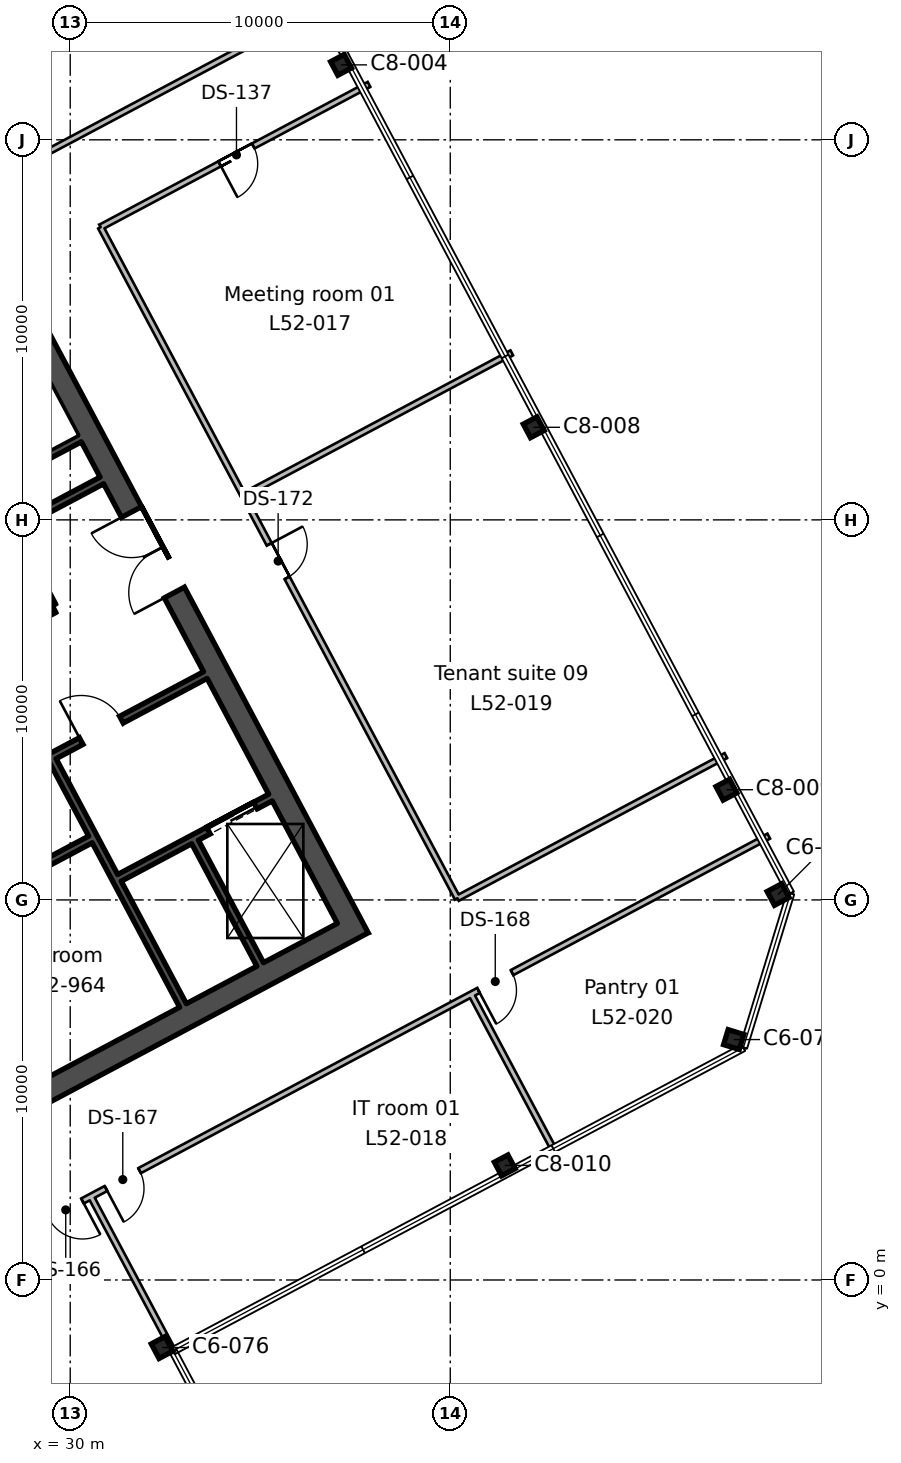
"""IFC4 building model, lengths in metres.
Left out: names, types, materials, properties, quantities, classifications, styles, units other than length and angle.
Written with IfcOpenShell. Run it as: python <this file> out.ifc"""

import sys

from ifc_helpers import new_model, si_unit, direction, frame, frame_2d, origin, origin_2d, place, context, subcontext, project, spatial, rectangle, i_section, extrude, element, fill, save


model = new_model("IFC4")
c1 = context("Model", 3, precision=1e-05, world=origin(), true_north=direction((0.0, 1.0)))
c2 = subcontext(c1, "Body", "Model", "MODEL_VIEW")
j1 = project(units=[si_unit("LENGTHUNIT", "METRE"), si_unit("PLANEANGLEUNIT", "RADIAN")], contexts=[c1])
p1 = place(None, origin())
s1 = spatial("IfcSite", under=j1, at=p1, CompositionType="ELEMENT")
p2 = place(p1, origin())
s2 = spatial("IfcBuilding", under=s1, at=p2, CompositionType="ELEMENT")
p3 = place(p2, frame((0.0, 0.0, 236.4)))
s3 = spatial("IfcBuildingStorey", under=s2, at=p3, CompositionType="ELEMENT", Elevation=236.4)
p4 = place(p3, frame((32.417, -1.777, 0.0), z_axis=(0.0, 0.0, 1.0), x_axis=(0.882947592859, 0.469471562786, 0.0)))
e1 = element("IfcColumn", 1, at=p4, inside=s3, PredefinedType="COLUMN", context=c2, shape_type="SweptSolid", body=[
    extrude(i_section(OverallWidth=0.412, OverallDepth=0.434, WebThickness=0.036, FlangeThickness=0.057, FilletRadius=0.015, at=origin_2d()), origin(), (0.0, 0.0, 1.0), 3.9),
])
p5 = place(p3, frame((41.434, 3.015, 0.0), z_axis=(0.0, 0.0, 1.0), x_axis=(0.882947592859, 0.469471562786, 0.0)))
e2 = element("IfcColumn", 2, at=p5, inside=s3, PredefinedType="COLUMN", context=c2, shape_type="SweptSolid", body=[
    extrude(i_section(OverallWidth=0.404, OverallDepth=0.406, WebThickness=0.027, FlangeThickness=0.044, FilletRadius=0.015, at=origin_2d()), origin(), (0.0, 0.0, 1.0), 3.9),
])
for number, where, z_axis, x_axis in (
    (3, (47.459, 6.326, 0.0), (0.0, 0.0, 1.0), (0.292, 0.956, 0.0)),
    (4, (48.626, 10.142, 0.0), (0.0, 0.0, 1.0), (-0.469, 0.883, 0.0)),
):
    element("IfcColumn", number, at=place(p3, frame(where, z_axis=z_axis, x_axis=x_axis)), inside=s3, PredefinedType="COLUMN", context=c2, shape_type="SweptSolid", body=[
        extrude(i_section(OverallWidth=0.412, OverallDepth=0.434, WebThickness=0.036, FlangeThickness=0.057, FilletRadius=0.015, at=origin_2d()), origin(), (0.0, 0.0, 1.0), 3.9),
    ])
for number, where, z_axis, x_axis in (
    (5, (47.266, 12.9, 0.0), (0.0, 0.0, 1.0), (-0.469, 0.883, 0.0)),
    (6, (42.196, 22.436, 0.0), (0.0, 0.0, 1.0), (-0.469, 0.883, 0.0)),
    (7, (37.126, 31.972, 0.0), (0.0, 0.0, 1.0), (-0.469, 0.883, 0.0)),
):
    element("IfcColumn", number, at=place(p3, frame(where, z_axis=z_axis, x_axis=x_axis)), inside=s3, PredefinedType="COLUMN", context=c2, shape_type="SweptSolid", body=[
        extrude(i_section(OverallWidth=0.404, OverallDepth=0.406, WebThickness=0.027, FlangeThickness=0.044, FilletRadius=0.015, at=origin_2d()), origin(), (0.0, 0.0, 1.0), 3.9),
    ])
p6 = place(p3, frame((37.576, 8.994, 0.0), z_axis=(0.0, 0.0, 1.0), x_axis=(-0.469478769487, 0.88294376095, 0.0)))
e8 = element("IfcWall", 8, at=p6, inside=s3, PredefinedType="SHEAR", context=c2, shape_type="SweptSolid", body=[
    extrude(rectangle(XDim=19.4, YDim=0.6, at=frame_2d((9.7, 0.0))), origin(), (0.0, 0.0, 1.0), 3.9),
])
p7 = place(p6, frame((10.3, 0.0, 0.0)))
e9 = element("IfcOpeningElement", 9, at=p7, cuts=e8, PredefinedType="OPENING", context=c2, shape_type="SweptSolid", body=[
    extrude(rectangle(XDim=2.4, YDim=2.4, at=frame_2d((1.2, 1.2))), frame((0.0, 0.31, 0.0), z_axis=(0.0, -1.0, 0.0), x_axis=(1.0, 0.0, 0.0)), (0.0, 0.0, 1.0), 0.62),
])
p8 = place(p3, frame((19.335, -0.366, 0.0), z_axis=(0.0, 0.0, 1.0), x_axis=(0.88294509198, 0.469476266226, 0.0)))
e10 = element("IfcWall", 10, at=p8, inside=s3, PredefinedType="SHEAR", context=c2, shape_type="SweptSolid", body=[
    extrude(rectangle(XDim=20.2, YDim=0.6, at=frame_2d((10.1, 0.0))), origin(), (0.0, 0.0, 1.0), 3.9),
])
p9 = place(p3, frame((32.968, 7.223, 0.0), z_axis=(0.0, 0.0, 1.0), x_axis=(-0.469480409012, 0.88294288918, 0.0)))
e11 = element("IfcWall", 11, at=p9, inside=s3, PredefinedType="SHEAR", context=c2, shape_type="SweptSolid", body=[
    extrude(rectangle(XDim=7.3, YDim=0.2, at=frame_2d((3.65, 0.0))), origin(), (0.0, 0.0, 1.0), 3.9),
])
p10 = place(p3, frame((29.528, 17.739, 0.0), z_axis=(0.0, 0.0, 1.0), x_axis=(-0.469401318492, 0.882984938828, 0.0)))
e12 = element("IfcWall", 12, at=p10, inside=s3, PredefinedType="SHEAR", context=c2, shape_type="SweptSolid", body=[
    extrude(rectangle(XDim=2.2, YDim=0.2, at=frame_2d((1.1, 0.0))), origin(), (0.0, 0.0, 1.0), 3.9),
])
p11 = place(p3, frame((34.999, 8.303, 0.0), z_axis=(0.0, 0.0, 1.0), x_axis=(-0.4694665462, 0.882950260207, 0.0)))
e13 = element("IfcWall", 13, at=p11, inside=s3, PredefinedType="SHEAR", context=c2, shape_type="SweptSolid", body=[
    extrude(rectangle(XDim=3.65, YDim=0.2, at=frame_2d((1.825, 0.0))), origin(), (0.0, 0.0, 1.0), 3.9),
])
p12 = place(p3, frame((31.296, 10.581, 0.0), z_axis=(0.0, 0.0, 1.0), x_axis=(0.882960433586, 0.469447412093, 0.0)))
e14 = element("IfcWall", 14, at=p12, inside=s3, PredefinedType="SHEAR", context=c2, shape_type="SweptSolid", body=[
    extrude(rectangle(XDim=4.5, YDim=0.2, at=frame_2d((2.25, 0.0))), origin(), (0.0, 0.0, 1.0), 3.9),
])
p13 = place(p12, frame((2.65, 0.0, 0.0)))
e15 = element("IfcOpeningElement", 15, at=p13, cuts=e14, PredefinedType="OPENING", context=c2, shape_type="SweptSolid", body=[
    extrude(rectangle(XDim=1.4, YDim=2.4, at=frame_2d((0.7, 1.2))), frame((0.0, 0.11, 0.0), z_axis=(0.0, -1.0, 0.0), x_axis=(1.0, 0.0, 0.0)), (0.0, 0.0, 1.0), 0.22),
])
p14 = place(p3, frame((25.941, 9.15, 0.0), z_axis=(0.0, 0.0, 1.0), x_axis=(0.882953967957, 0.469459572775, 0.0)))
e16 = element("IfcWall", 16, at=p14, inside=s3, PredefinedType="SHEAR", context=c2, shape_type="SweptSolid", body=[
    extrude(rectangle(XDim=5.2, YDim=0.2, at=frame_2d((2.6, 0.0))), origin(), (0.0, 0.0, 1.0), 3.9),
])
p15 = place(p3, frame((24.726, 11.222, 0.0), z_axis=(0.0, 0.0, 1.0), x_axis=(0.882940221191, 0.469485426614, 0.0)))
e17 = element("IfcWall", 17, at=p15, inside=s3, PredefinedType="SHEAR", context=c2, shape_type="SweptSolid", body=[
    extrude(rectangle(XDim=10.0, YDim=0.2, at=frame_2d((5.0, 0.0))), origin(), (0.0, 0.0, 1.0), 3.9),
])
p16 = place(p15, frame((6.3, 0.0, 0.0)))
e18 = element("IfcOpeningElement", 18, at=p16, cuts=e17, PredefinedType="OPENING", context=c2, shape_type="SweptSolid", body=[
    extrude(rectangle(XDim=1.2, YDim=2.1, at=frame_2d((0.6, 1.05))), frame((0.0, 0.11, 0.0), z_axis=(0.0, -1.0, 0.0), x_axis=(1.0, 0.0, 0.0)), (0.0, 0.0, 1.0), 0.22),
])
p17 = place(p15, frame((0.36, 0.0, 0.0)))
e19 = element("IfcOpeningElement", 19, at=p17, cuts=e17, PredefinedType="OPENING", context=c2, shape_type="SweptSolid", body=[
    extrude(rectangle(XDim=0.9, YDim=2.1, at=frame_2d((0.45, 1.05))), frame((0.0, 0.11, 0.0), z_axis=(0.0, -1.0, 0.0), x_axis=(1.0, 0.0, 0.0)), (0.0, 0.0, 1.0), 0.22),
])
p18 = place(p15, frame((3.06, 0.0, 0.0)))
e20 = element("IfcOpeningElement", 20, at=p18, cuts=e17, PredefinedType="OPENING", context=c2, shape_type="SweptSolid", body=[
    extrude(rectangle(XDim=0.9, YDim=2.1, at=frame_2d((0.45, 1.05))), frame((0.0, 0.11, 0.0), z_axis=(0.0, -1.0, 0.0), x_axis=(1.0, 0.0, 0.0)), (0.0, 0.0, 1.0), 0.22),
])
p19 = place(p3, frame((24.807, 15.116, 0.0), z_axis=(0.0, 0.0, 1.0), x_axis=(0.882942972946, 0.469480251476, 0.0)))
e21 = element("IfcWall", 21, at=p19, inside=s3, PredefinedType="SHEAR", context=c2, shape_type="SweptSolid", body=[
    extrude(rectangle(XDim=5.4, YDim=0.2, at=frame_2d((2.7, 0.0))), origin(), (0.0, 0.0, 1.0), 3.9),
])
p20 = place(p19, frame((0.36, 0.0, 0.0)))
e22 = element("IfcOpeningElement", 22, at=p20, cuts=e21, PredefinedType="OPENING", context=c2, shape_type="SweptSolid", body=[
    extrude(rectangle(XDim=0.9, YDim=2.1, at=frame_2d((0.45, 1.05))), frame((0.0, 0.11, 0.0), z_axis=(0.0, -1.0, 0.0), x_axis=(1.0, 0.0, 0.0)), (0.0, 0.0, 1.0), 0.22),
])
p21 = place(p19, frame((3.06, 0.0, 0.0)))
e23 = element("IfcOpeningElement", 23, at=p21, cuts=e21, PredefinedType="OPENING", context=c2, shape_type="SweptSolid", body=[
    extrude(rectangle(XDim=0.9, YDim=2.1, at=frame_2d((0.45, 1.05))), frame((0.0, 0.11, 0.0), z_axis=(0.0, -1.0, 0.0), x_axis=(1.0, 0.0, 0.0)), (0.0, 0.0, 1.0), 0.22),
])
p22 = place(p3, frame((23.769, 17.282, 0.0), z_axis=(0.0, 0.0, 1.0), x_axis=(0.882940221191, 0.469485426614, 0.0)))
e24 = element("IfcWall", 24, at=p22, inside=s3, PredefinedType="SHEAR", context=c2, shape_type="SweptSolid", body=[
    extrude(rectangle(XDim=8.0, YDim=0.2, at=frame_2d((4.0, 0.0))), origin(), (0.0, 0.0, 1.0), 3.9),
])
p23 = place(p3, frame((23.182, 18.385, 0.0), z_axis=(0.0, 0.0, 1.0), x_axis=(0.88295287151, 0.469461634952, 0.0)))
e25 = element("IfcWall", 25, at=p23, inside=s3, PredefinedType="SHEAR", context=c2, shape_type="SweptSolid", body=[
    extrude(rectangle(XDim=8.0, YDim=0.2, at=frame_2d((4.0, 0.0))), origin(), (0.0, 0.0, 1.0), 3.9),
])
p24 = place(p3, frame((0.0, 14.044, 0.0), z_axis=(0.0, 0.0, 1.0), x_axis=(0.882962129795, 0.469444221764, 0.0)))
e26 = element("IfcWall", 26, at=p24, inside=s3, PredefinedType="PARTITIONING", context=c2, shape_type="SweptSolid", body=[
    extrude(rectangle(XDim=41.607, YDim=0.15, at=frame_2d((20.803, 0.0))), origin(), (0.0, 0.0, 1.0), 3.54),
])
p25 = place(p24, frame((19.95, 0.0, 0.0)))
e27 = element("IfcOpeningElement", 27, at=p25, cuts=e26, PredefinedType="OPENING", context=c2, shape_type="SweptSolid", body=[
    extrude(rectangle(XDim=1.8, YDim=2.1, at=frame_2d((0.9, 1.05))), frame((0.0, 0.085, 0.0), z_axis=(0.0, -1.0, 0.0), x_axis=(1.0, 0.0, 0.0)), (0.0, 0.0, 1.0), 0.17),
])
p26 = place(p24, frame((10.25, 0.0, 0.0)))
e28 = element("IfcOpeningElement", 28, at=p26, cuts=e26, PredefinedType="OPENING", context=c2, shape_type="SweptSolid", body=[
    extrude(rectangle(XDim=1.0, YDim=2.1, at=frame_2d((0.5, 1.05))), frame((0.0, 0.085, 0.0), z_axis=(0.0, -1.0, 0.0), x_axis=(1.0, 0.0, 0.0)), (0.0, 0.0, 1.0), 0.17),
])
p27 = place(p3, frame((48.38, 11.679, 0.0), z_axis=(0.0, 0.0, 1.0), x_axis=(-0.882955973974, -0.469455799862, 0.0)))
e29 = element("IfcWall", 29, at=p27, inside=s3, PredefinedType="PARTITIONING", context=c2, shape_type="SweptSolid", body=[
    extrude(rectangle(XDim=39.39, YDim=0.15, at=frame_2d((19.695, 0.0))), origin(), (0.0, 0.0, 1.0), 3.54),
])
p28 = place(p27, frame((20.45, 0.0, 0.0)))
e30 = element("IfcOpeningElement", 30, at=p28, cuts=e29, PredefinedType="OPENING", context=c2, shape_type="SweptSolid", body=[
    extrude(rectangle(XDim=1.0, YDim=2.1, at=frame_2d((0.5, 1.05))), frame((0.0, 0.085, 0.0), z_axis=(0.0, -1.0, 0.0), x_axis=(1.0, 0.0, 0.0)), (0.0, 0.0, 1.0), 0.17),
])
p29 = place(p27, frame((18.75, 0.0, 0.0)))
e31 = element("IfcOpeningElement", 31, at=p29, cuts=e29, PredefinedType="OPENING", context=c2, shape_type="SweptSolid", body=[
    extrude(rectangle(XDim=1.0, YDim=2.1, at=frame_2d((0.5, 1.05))), frame((0.0, 0.085, 0.0), z_axis=(0.0, -1.0, 0.0), x_axis=(1.0, 0.0, 0.0)), (0.0, 0.0, 1.0), 0.17),
])
p30 = place(p27, frame((7.65, 0.0, 0.0)))
e32 = element("IfcOpeningElement", 32, at=p30, cuts=e29, PredefinedType="OPENING", context=c2, shape_type="SweptSolid", body=[
    extrude(rectangle(XDim=1.0, YDim=2.1, at=frame_2d((0.5, 1.05))), frame((0.0, 0.085, 0.0), z_axis=(0.0, -1.0, 0.0), x_axis=(1.0, 0.0, 0.0)), (0.0, 0.0, 1.0), 0.17),
])
p31 = place(p3, frame((30.544, 2.197, 0.0), z_axis=(0.0, 0.0, 1.0), x_axis=(0.469518415739, -0.882922679107, 0.0)))
e33 = element("IfcWall", 33, at=p31, inside=s3, PredefinedType="PARTITIONING", context=c2, shape_type="SweptSolid", body=[
    extrude(rectangle(XDim=4.882, YDim=0.15, at=frame_2d((2.441, 0.0))), origin(), (0.0, 0.0, 1.0), 3.54),
])
p32 = place(p3, frame((40.551, 7.517, 0.0), z_axis=(0.0, 0.0, 1.0), x_axis=(0.469394470311, -0.882988579338, 0.0)))
e34 = element("IfcWall", 34, at=p32, inside=s3, PredefinedType="PARTITIONING", context=c2, shape_type="SweptSolid", body=[
    extrude(rectangle(XDim=4.8, YDim=0.15, at=frame_2d((2.4, 0.0))), origin(), (0.0, 0.0, 1.0), 3.54),
])
p33 = place(p3, frame((37.863, 31.458, 0.0), z_axis=(0.0, 0.0, 1.0), x_axis=(-0.882914115089, -0.469534519898, 0.0)))
e35 = element("IfcWall", 35, at=p33, inside=s3, PredefinedType="PARTITIONING", context=c2, shape_type="SweptSolid", body=[
    extrude(rectangle(XDim=8.0, YDim=0.15, at=frame_2d((4.0, 0.0))), origin(), (0.0, 0.0, 1.0), 3.54),
])
p34 = place(p33, frame((3.451, 0.0, 0.0)))
e36 = element("IfcOpeningElement", 36, at=p34, cuts=e35, PredefinedType="OPENING", context=c2, shape_type="SweptSolid", body=[
    extrude(rectangle(XDim=1.0, YDim=2.1, at=frame_2d((0.5, 1.05))), frame((0.0, 0.085, 0.0), z_axis=(0.0, -1.0, 0.0), x_axis=(1.0, 0.0, 0.0)), (0.0, 0.0, 1.0), 0.17),
])
p35 = place(p3, frame((30.8, 27.702, 0.0), z_axis=(0.0, 0.0, 1.0), x_axis=(0.469451816494, -0.882958091865, 0.0)))
e37 = element("IfcWall", 37, at=p35, inside=s3, PredefinedType="PARTITIONING", context=c2, shape_type="SweptSolid", body=[
    extrude(rectangle(XDim=20.0, YDim=0.15, at=frame_2d((10.0, 0.0))), origin(), (0.0, 0.0, 1.0), 3.54),
])
p36 = place(p35, frame((9.45, 0.0, 0.0)))
e38 = element("IfcOpeningElement", 38, at=p36, cuts=e37, PredefinedType="OPENING", context=c2, shape_type="SweptSolid", body=[
    extrude(rectangle(XDim=1.0, YDim=2.1, at=frame_2d((0.5, 1.05))), frame((0.0, 0.085, 0.0), z_axis=(0.0, -1.0, 0.0), x_axis=(1.0, 0.0, 0.0)), (0.0, 0.0, 1.0), 0.17),
])
p37 = place(p3, frame((40.189, 10.043, 0.0), z_axis=(0.0, 0.0, 1.0), x_axis=(0.882991619958, 0.469388750487, 0.0)))
e39 = element("IfcWall", 39, at=p37, inside=s3, PredefinedType="PARTITIONING", context=c2, shape_type="SweptSolid", body=[
    extrude(rectangle(XDim=8.0, YDim=0.15, at=frame_2d((4.0, 0.0))), origin(), (0.0, 0.0, 1.0), 3.54),
])
p38 = place(p3, frame((41.619, 24.395, 0.0), z_axis=(0.0, 0.0, 1.0), x_axis=(-0.882914115089, -0.469534519898, 0.0)))
e40 = element("IfcWall", 40, at=p38, inside=s3, PredefinedType="PARTITIONING", context=c2, shape_type="SweptSolid", body=[
    extrude(rectangle(XDim=8.0, YDim=0.15, at=frame_2d((4.0, 0.0))), origin(), (0.0, 0.0, 1.0), 3.54),
])
p39 = place(p7, origin())
e41 = element("IfcDoor", 41, at=p39, inside=s3, OperationType="DOUBLE_DOOR_SINGLE_SWING", PredefinedType="DOOR", context=c2, shape_type="SweptSolid", body=[
    extrude(rectangle(XDim=2.4, YDim=2.4, at=frame_2d((1.2, 1.2))), frame((0.0, 0.025, 0.0), z_axis=(0.0, -1.0, 0.0), x_axis=(1.0, 0.0, 0.0)), (0.0, 0.0, 1.0), 0.05),
])
fill(e9, e41)
p40 = place(p16, origin())
e42 = element("IfcDoor", 42, at=p40, inside=s3, OperationType="SINGLE_SWING_LEFT", PredefinedType="DOOR", context=c2, shape_type="SweptSolid", body=[
    extrude(rectangle(XDim=1.2, YDim=2.1, at=frame_2d((0.6, 1.05))), frame((0.0, 0.025, 0.0), z_axis=(0.0, -1.0, 0.0), x_axis=(1.0, 0.0, 0.0)), (0.0, 0.0, 1.0), 0.05),
])
fill(e18, e42)
p41 = place(p13, origin())
e43 = element("IfcDoor", 43, at=p41, inside=s3, OperationType="DOUBLE_DOOR_SLIDING", PredefinedType="DOOR", context=c2, shape_type="SweptSolid", body=[
    extrude(rectangle(XDim=1.4, YDim=2.4, at=frame_2d((0.7, 1.2))), frame((0.0, 0.025, 0.0), z_axis=(0.0, -1.0, 0.0), x_axis=(1.0, 0.0, 0.0)), (0.0, 0.0, 1.0), 0.05),
])
fill(e15, e43)
p42 = place(p28, origin())
e44 = element("IfcDoor", 44, at=p42, inside=s3, OperationType="SINGLE_SWING_LEFT", PredefinedType="DOOR", context=c2, shape_type="SweptSolid", body=[
    extrude(rectangle(XDim=1.0, YDim=2.1, at=frame_2d((0.5, 1.05))), frame((0.0, 0.025, 0.0), z_axis=(0.0, -1.0, 0.0), x_axis=(1.0, 0.0, 0.0)), (0.0, 0.0, 1.0), 0.05),
])
fill(e30, e44)
p43 = place(p29, origin())
e45 = element("IfcDoor", 45, at=p43, inside=s3, OperationType="SINGLE_SWING_RIGHT", PredefinedType="DOOR", context=c2, shape_type="SweptSolid", body=[
    extrude(rectangle(XDim=1.0, YDim=2.1, at=frame_2d((0.5, 1.05))), frame((0.0, 0.025, 0.0), z_axis=(0.0, -1.0, 0.0), x_axis=(1.0, 0.0, 0.0)), (0.0, 0.0, 1.0), 0.05),
])
fill(e31, e45)
p44 = place(p30, origin())
e46 = element("IfcDoor", 46, at=p44, inside=s3, OperationType="SINGLE_SWING_RIGHT", PredefinedType="DOOR", context=c2, shape_type="SweptSolid", body=[
    extrude(rectangle(XDim=1.0, YDim=2.1, at=frame_2d((0.5, 1.05))), frame((0.0, 0.025, 0.0), z_axis=(0.0, -1.0, 0.0), x_axis=(1.0, 0.0, 0.0)), (0.0, 0.0, 1.0), 0.05),
])
fill(e32, e46)
p45 = place(p36, origin())
e47 = element("IfcDoor", 47, at=p45, inside=s3, OperationType="SINGLE_SWING_LEFT", PredefinedType="DOOR", context=c2, shape_type="SweptSolid", body=[
    extrude(rectangle(XDim=1.0, YDim=2.1, at=frame_2d((0.5, 1.05))), frame((0.0, 0.025, 0.0), z_axis=(0.0, -1.0, 0.0), x_axis=(1.0, 0.0, 0.0)), (0.0, 0.0, 1.0), 0.05),
])
fill(e38, e47)
p46 = place(p34, origin())
e48 = element("IfcDoor", 48, at=p46, inside=s3, OperationType="SINGLE_SWING_RIGHT", PredefinedType="DOOR", context=c2, shape_type="SweptSolid", body=[
    extrude(rectangle(XDim=1.0, YDim=2.1, at=frame_2d((0.5, 1.05))), frame((0.0, 0.025, 0.0), z_axis=(0.0, -1.0, 0.0), x_axis=(1.0, 0.0, 0.0)), (0.0, 0.0, 1.0), 0.05),
])
fill(e36, e48)
save(model, sys.argv[1])
